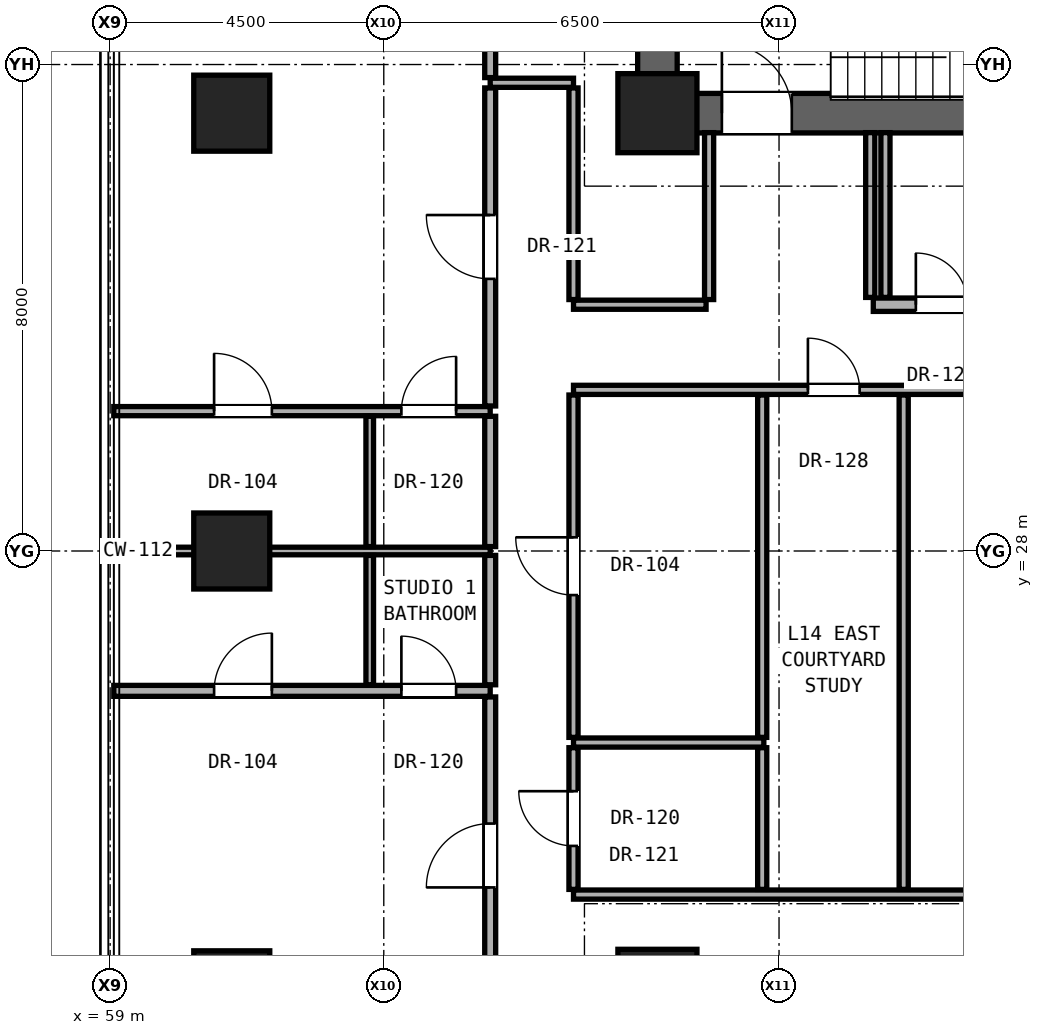
"""IFC4 building model, lengths in metres.
Left out: names, types, materials, properties, quantities, classifications, styles, units other than length and angle.
Written with IfcOpenShell. Run it as: python <this file> out.ifc"""

import sys

from ifc_helpers import new_model, si_unit, direction, frame, frame_2d, origin, origin_2d, place, context, subcontext, project, spatial, rectangle, hollow_rectangle, extrude, element, fill, save


model = new_model("IFC4")
c1 = context("Model", 3, precision=1e-05, world=origin(), true_north=direction((0.0, 1.0)))
c2 = subcontext(c1, "Body", "Model", "MODEL_VIEW")
j1 = project(units=[si_unit("LENGTHUNIT", "METRE"), si_unit("PLANEANGLEUNIT", "RADIAN")], contexts=[c1])
p1 = place(None, origin())
s1 = spatial("IfcSite", under=j1, at=p1, CompositionType="ELEMENT")
p2 = place(p1, origin())
s2 = spatial("IfcBuilding", under=s1, at=p2, CompositionType="ELEMENT")
p3 = place(p2, frame((0.0, 0.0, 52.1)))
s3 = spatial("IfcBuildingStorey", under=s2, at=p3, CompositionType="ELEMENT", Elevation=52.1)
for number, where, z_axis, x_axis in (
    (1, (68.0, 20.8, 0.0), (0.0, 0.0, 1.0), (1.0, 0.0, 0.0)),
    (2, (68.0, 35.2, 0.0), (0.0, 0.0, 1.0), (1.0, 0.0, 0.0)),
):
    element("IfcColumn", number, at=place(p3, frame(where, z_axis=z_axis, x_axis=x_axis)), inside=s3, PredefinedType="COLUMN", context=c2, shape_type="SweptSolid", body=[
        extrude(rectangle(XDim=1.3, YDim=1.3, at=origin_2d()), origin(), (0.0, 0.0, 1.0), 3.3),
    ])
for number, where, z_axis, x_axis in (
    (3, (61.0, 20.8, 0.0), (0.0, 0.0, 1.0), (1.0, 0.0, 0.0)),
    (4, (61.0, 28.0, 0.0), (0.0, 0.0, 1.0), (1.0, 0.0, 0.0)),
    (5, (61.0, 35.2, 0.0), (0.0, 0.0, 1.0), (1.0, 0.0, 0.0)),
):
    element("IfcColumn", number, at=place(p3, frame(where, z_axis=z_axis, x_axis=x_axis)), inside=s3, PredefinedType="COLUMN", context=c2, shape_type="SweptSolid", body=[
        extrude(hollow_rectangle(XDim=1.25, YDim=1.25, WallThickness=0.07, at=origin_2d()), origin(), (0.0, 0.0, 1.0), 3.3),
    ])
p4 = place(p3, frame((68.0, 35.2, 0.0), z_axis=(0.0, 0.0, 1.0), x_axis=(0.0, 1.0, 0.0)))
e6 = element("IfcWall", 6, at=p4, inside=s3, PredefinedType="SHEAR", context=c2, shape_type="SweptSolid", body=[
    extrude(rectangle(XDim=5.6, YDim=0.65, at=frame_2d((2.8, 0.0))), origin(), (0.0, 0.0, 1.0), 3.06),
])
p5 = place(p3, frame((68.0, 35.2, 0.0), z_axis=(0.0, 0.0, 1.0), x_axis=(1.0, 0.0, 0.0)))
e7 = element("IfcWall", 7, at=p5, inside=s3, PredefinedType="SHEAR", context=c2, shape_type="SweptSolid", body=[
    extrude(rectangle(XDim=17.0, YDim=0.65, at=frame_2d((8.5, 0.0))), origin(), (0.0, 0.0, 1.0), 3.06),
])
p6 = place(p5, frame((1.06, 0.0, 0.0)))
e8 = element("IfcOpeningElement", 8, at=p6, cuts=e7, PredefinedType="OPENING", context=c2, shape_type="SweptSolid", body=[
    extrude(rectangle(XDim=1.15, YDim=2.2, at=frame_2d((0.575, 1.1))), frame((0.0, 0.335, 0.0), z_axis=(0.0, -1.0, 0.0), x_axis=(1.0, 0.0, 0.0)), (0.0, 0.0, 1.0), 0.67),
])
p7 = place(p5, frame((8.75, 0.0, 0.0)))
e9 = element("IfcOpeningElement", 9, at=p7, cuts=e7, PredefinedType="OPENING", context=c2, shape_type="SweptSolid", body=[
    extrude(rectangle(XDim=1.4, YDim=2.35, at=frame_2d((0.7, 1.175))), frame((0.0, 0.335, 0.0), z_axis=(0.0, -1.0, 0.0), x_axis=(1.0, 0.0, 0.0)), (0.0, 0.0, 1.0), 0.67),
])
p8 = place(p5, frame((10.77, 0.0, 0.0)))
e10 = element("IfcOpeningElement", 10, at=p8, cuts=e7, PredefinedType="OPENING", context=c2, shape_type="SweptSolid", body=[
    extrude(rectangle(XDim=1.3, YDim=2.3, at=frame_2d((0.65, 1.15))), frame((0.0, 0.335, 0.0), z_axis=(0.0, -1.0, 0.0), x_axis=(1.0, 0.0, 0.0)), (0.0, 0.0, 1.0), 0.67),
])
p9 = place(p5, frame((12.69, 0.0, 0.0)))
e11 = element("IfcOpeningElement", 11, at=p9, cuts=e7, PredefinedType="OPENING", context=c2, shape_type="SweptSolid", body=[
    extrude(rectangle(XDim=1.3, YDim=2.3, at=frame_2d((0.65, 1.15))), frame((0.0, 0.335, 0.0), z_axis=(0.0, -1.0, 0.0), x_axis=(1.0, 0.0, 0.0)), (0.0, 0.0, 1.0), 0.67),
])
p10 = place(p5, frame((14.57, 0.0, 0.0)))
e12 = element("IfcOpeningElement", 12, at=p10, cuts=e7, PredefinedType="OPENING", context=c2, shape_type="SweptSolid", body=[
    extrude(rectangle(XDim=1.3, YDim=2.3, at=frame_2d((0.65, 1.15))), frame((0.0, 0.335, 0.0), z_axis=(0.0, -1.0, 0.0), x_axis=(1.0, 0.0, 0.0)), (0.0, 0.0, 1.0), 0.67),
])
p11 = place(p3, frame((66.62, 22.35, 0.0), z_axis=(0.0, 0.0, 1.0), x_axis=(1.0, 0.0, 0.0)))
e13 = element("IfcWall", 13, at=p11, inside=s3, PredefinedType="PARTITIONING", context=c2, shape_type="SweptSolid", body=[
    extrude(rectangle(XDim=19.63, YDim=0.15, at=frame_2d((9.815, 0.0))), origin(), (0.0, 0.0, 1.0), 2.125),
])
p12 = place(p11, frame((8.129, 0.0, 0.0)))
e14 = element("IfcOpeningElement", 14, at=p12, cuts=e13, PredefinedType="OPENING", context=c2, shape_type="SweptSolid", body=[
    extrude(rectangle(XDim=0.85, YDim=2.01, at=frame_2d((0.425, 1.005))), frame((0.0, 0.085, 0.0), z_axis=(0.0, -1.0, 0.0), x_axis=(1.0, 0.0, 0.0)), (0.0, 0.0, 1.0), 0.17),
])
p13 = place(p3, frame((66.62, 24.85, 0.0), z_axis=(0.0, 0.0, 1.0), x_axis=(1.0, 0.0, 0.0)))
e15 = element("IfcWall", 15, at=p13, inside=s3, PredefinedType="PARTITIONING", context=c2, shape_type="SweptSolid", body=[
    extrude(rectangle(XDim=3.13, YDim=0.15, at=frame_2d((1.565, 0.0))), origin(), (0.0, 0.0, 1.0), 2.125),
])
p14 = place(p3, frame((59.06, 25.7, 0.0), z_axis=(0.0, 0.0, 1.0), x_axis=(1.0, 0.0, 0.0)))
e16 = element("IfcWall", 16, at=p14, inside=s3, PredefinedType="PARTITIONING", context=c2, shape_type="SweptSolid", body=[
    extrude(rectangle(XDim=6.19, YDim=0.18, at=frame_2d((3.095, 0.0))), origin(), (0.0, 0.0, 1.0), 2.196),
])
p15 = place(p14, frame((1.649, 0.0, 0.0)))
e17 = element("IfcOpeningElement", 17, at=p15, cuts=e16, PredefinedType="OPENING", context=c2, shape_type="SweptSolid", body=[
    extrude(rectangle(XDim=0.95, YDim=2.15, at=frame_2d((0.475, 1.075))), frame((0.0, 0.1, 0.0), z_axis=(0.0, -1.0, 0.0), x_axis=(1.0, 0.0, 0.0)), (0.0, 0.0, 1.0), 0.2),
])
p16 = place(p14, frame((4.729, 0.0, 0.0)))
e18 = element("IfcOpeningElement", 18, at=p16, cuts=e16, PredefinedType="OPENING", context=c2, shape_type="SweptSolid", body=[
    extrude(rectangle(XDim=0.9, YDim=2.1, at=frame_2d((0.45, 1.05))), frame((0.0, 0.1, 0.0), z_axis=(0.0, -1.0, 0.0), x_axis=(1.0, 0.0, 0.0)), (0.0, 0.0, 1.0), 0.2),
])
p17 = place(p3, frame((59.06, 28.0, 0.0), z_axis=(0.0, 0.0, 1.0), x_axis=(1.0, 0.0, 0.0)))
e19 = element("IfcWall", 19, at=p17, inside=s3, PredefinedType="PARTITIONING", context=c2, shape_type="SweptSolid", body=[
    extrude(rectangle(XDim=6.19, YDim=0.125, at=frame_2d((3.095, 0.0))), origin(), (0.0, 0.0, 1.0), 2.196),
])
p18 = place(p3, frame((59.06, 30.3, 0.0), z_axis=(0.0, 0.0, 1.0), x_axis=(1.0, 0.0, 0.0)))
e20 = element("IfcWall", 20, at=p18, inside=s3, PredefinedType="PARTITIONING", context=c2, shape_type="SweptSolid", body=[
    extrude(rectangle(XDim=6.19, YDim=0.15, at=frame_2d((3.095, 0.0))), origin(), (0.0, 0.0, 1.0), 2.196),
])
p19 = place(p18, frame((1.649, 0.0, 0.0)))
e21 = element("IfcOpeningElement", 21, at=p19, cuts=e20, PredefinedType="OPENING", context=c2, shape_type="SweptSolid", body=[
    extrude(rectangle(XDim=0.95, YDim=2.15, at=frame_2d((0.475, 1.075))), frame((0.0, 0.085, 0.0), z_axis=(0.0, -1.0, 0.0), x_axis=(1.0, 0.0, 0.0)), (0.0, 0.0, 1.0), 0.17),
])
p20 = place(p18, frame((4.729, 0.0, 0.0)))
e22 = element("IfcOpeningElement", 22, at=p20, cuts=e20, PredefinedType="OPENING", context=c2, shape_type="SweptSolid", body=[
    extrude(rectangle(XDim=0.9, YDim=2.1, at=frame_2d((0.45, 1.05))), frame((0.0, 0.085, 0.0), z_axis=(0.0, -1.0, 0.0), x_axis=(1.0, 0.0, 0.0)), (0.0, 0.0, 1.0), 0.17),
])
p21 = place(p3, frame((66.62, 30.65, 0.0), z_axis=(0.0, 0.0, 1.0), x_axis=(1.0, 0.0, 0.0)))
e23 = element("IfcWall", 23, at=p21, inside=s3, PredefinedType="PARTITIONING", context=c2, shape_type="SweptSolid", body=[
    extrude(rectangle(XDim=19.63, YDim=0.15, at=frame_2d((9.815, 0.0))), origin(), (0.0, 0.0, 1.0), 2.125),
])
p22 = place(p21, frame((3.855, 0.0, 0.0)))
e24 = element("IfcOpeningElement", 24, at=p22, cuts=e23, PredefinedType="OPENING", context=c2, shape_type="SweptSolid", body=[
    extrude(rectangle(XDim=0.85, YDim=2.01, at=frame_2d((0.425, 1.005))), frame((0.0, 0.085, 0.0), z_axis=(0.0, -1.0, 0.0), x_axis=(1.0, 0.0, 0.0)), (0.0, 0.0, 1.0), 0.17),
])
p23 = place(p21, frame((15.209, 0.0, 0.0)))
e25 = element("IfcOpeningElement", 25, at=p23, cuts=e23, PredefinedType="OPENING", context=c2, shape_type="SweptSolid", body=[
    extrude(rectangle(XDim=0.85, YDim=2.01, at=frame_2d((0.425, 1.005))), frame((0.0, 0.085, 0.0), z_axis=(0.0, -1.0, 0.0), x_axis=(1.0, 0.0, 0.0)), (0.0, 0.0, 1.0), 0.17),
])
p24 = place(p3, frame((66.62, 32.05, 0.0), z_axis=(0.0, 0.0, 1.0), x_axis=(1.0, 0.0, 0.0)))
e26 = element("IfcWall", 26, at=p24, inside=s3, PredefinedType="PARTITIONING", context=c2, shape_type="SweptSolid", body=[
    extrude(rectangle(XDim=2.18, YDim=0.15, at=frame_2d((1.09, 0.0))), origin(), (0.0, 0.0, 1.0), 2.125),
])
p25 = place(p3, frame((71.55, 32.05, 0.0), z_axis=(0.0, 0.0, 1.0), x_axis=(1.0, 0.0, 0.0)))
e27 = element("IfcWall", 27, at=p25, inside=s3, PredefinedType="SOLIDWALL", context=c2, shape_type="SweptSolid", body=[
    extrude(rectangle(XDim=14.7, YDim=0.22, at=frame_2d((7.35, 0.0))), origin(), (0.0, 0.0, 1.0), 2.125),
])
p26 = place(p25, frame((11.39, 0.0, 0.0)))
e28 = element("IfcOpeningElement", 28, at=p26, cuts=e27, PredefinedType="OPENING", context=c2, shape_type="SweptSolid", body=[
    extrude(rectangle(XDim=0.85, YDim=2.01, at=frame_2d((0.425, 1.005))), frame((0.0, 0.12, 0.0), z_axis=(0.0, -1.0, 0.0), x_axis=(1.0, 0.0, 0.0)), (0.0, 0.0, 1.0), 0.24),
])
p27 = place(p25, frame((6.065, 0.0, 0.0)))
e29 = element("IfcOpeningElement", 29, at=p27, cuts=e27, PredefinedType="OPENING", context=c2, shape_type="SweptSolid", body=[
    extrude(rectangle(XDim=0.85, YDim=2.01, at=frame_2d((0.425, 1.005))), frame((0.0, 0.12, 0.0), z_axis=(0.0, -1.0, 0.0), x_axis=(1.0, 0.0, 0.0)), (0.0, 0.0, 1.0), 0.24),
])
p28 = place(p25, frame((0.7, 0.0, 0.0)))
e30 = element("IfcOpeningElement", 30, at=p28, cuts=e27, PredefinedType="OPENING", context=c2, shape_type="SweptSolid", body=[
    extrude(rectangle(XDim=0.85, YDim=2.01, at=frame_2d((0.425, 1.005))), frame((0.0, 0.12, 0.0), z_axis=(0.0, -1.0, 0.0), x_axis=(1.0, 0.0, 0.0)), (0.0, 0.0, 1.0), 0.24),
])
p29 = place(p25, frame((2.55, 0.0, 0.0)))
e31 = element("IfcOpeningElement", 31, at=p29, cuts=e27, PredefinedType="OPENING", context=c2, shape_type="SweptSolid", body=[
    extrude(rectangle(XDim=0.85, YDim=2.01, at=frame_2d((0.425, 1.005))), frame((0.0, 0.12, 0.0), z_axis=(0.0, -1.0, 0.0), x_axis=(1.0, 0.0, 0.0)), (0.0, 0.0, 1.0), 0.24),
])
p30 = place(p3, frame((65.25, 35.7, 0.0), z_axis=(0.0, 0.0, 1.0), x_axis=(1.0, 0.0, 0.0)))
e32 = element("IfcWall", 32, at=p30, inside=s3, PredefinedType="PARTITIONING", context=c2, shape_type="SweptSolid", body=[
    extrude(rectangle(XDim=1.37, YDim=0.15, at=frame_2d((0.685, 0.0))), origin(), (0.0, 0.0, 1.0), 3.06),
])
p31 = place(p3, frame((63.269, 25.8, 0.0), z_axis=(0.0, 0.0, 1.0), x_axis=(0.0, 1.0, 0.0)))
e33 = element("IfcWall", 33, at=p31, inside=s3, PredefinedType="PARTITIONING", context=c2, shape_type="SweptSolid", body=[
    extrude(rectangle(XDim=2.127, YDim=0.125, at=frame_2d((1.064, 0.0))), origin(), (0.0, 0.0, 1.0), 2.279),
])
p32 = place(p3, frame((63.269, 28.073, 0.0), z_axis=(0.0, 0.0, 1.0), x_axis=(0.0, 1.0, 0.0)))
e34 = element("IfcWall", 34, at=p32, inside=s3, PredefinedType="PARTITIONING", context=c2, shape_type="SweptSolid", body=[
    extrude(rectangle(XDim=2.143, YDim=0.125, at=frame_2d((1.071, 0.0))), origin(), (0.0, 0.0, 1.0), 2.279),
])
p33 = place(p3, frame((65.25, 20.385, 0.0), z_axis=(0.0, 0.0, 1.0), x_axis=(0.0, 1.0, 0.0)))
e35 = element("IfcWall", 35, at=p33, inside=s3, PredefinedType="PARTITIONING", context=c2, shape_type="SweptSolid", body=[
    extrude(rectangle(XDim=5.215, YDim=0.18, at=frame_2d((2.607, 0.0))), origin(), (0.0, 0.0, 1.0), 2.452),
])
p34 = place(p33, frame((2.083, 0.0, 0.0)))
e36 = element("IfcOpeningElement", 36, at=p34, cuts=e35, PredefinedType="OPENING", context=c2, shape_type="SweptSolid", body=[
    extrude(rectangle(XDim=1.05, YDim=2.2, at=frame_2d((0.525, 1.1))), frame((0.0, 0.1, 0.0), z_axis=(0.0, -1.0, 0.0), x_axis=(1.0, 0.0, 0.0)), (0.0, 0.0, 1.0), 0.2),
])
p35 = place(p3, frame((65.25, 25.8, 0.0), z_axis=(0.0, 0.0, 1.0), x_axis=(0.0, 1.0, 0.0)))
e37 = element("IfcWall", 37, at=p35, inside=s3, PredefinedType="PARTITIONING", context=c2, shape_type="SweptSolid", body=[
    extrude(rectangle(XDim=2.127, YDim=0.18, at=frame_2d((1.064, 0.0))), origin(), (0.0, 0.0, 1.0), 2.279),
])
p36 = place(p3, frame((65.25, 28.073, 0.0), z_axis=(0.0, 0.0, 1.0), x_axis=(0.0, 1.0, 0.0)))
e38 = element("IfcWall", 38, at=p36, inside=s3, PredefinedType="PARTITIONING", context=c2, shape_type="SweptSolid", body=[
    extrude(rectangle(XDim=2.143, YDim=0.18, at=frame_2d((1.071, 0.0))), origin(), (0.0, 0.0, 1.0), 2.279),
])
p37 = place(p3, frame((65.25, 30.385, 0.0), z_axis=(0.0, 0.0, 1.0), x_axis=(0.0, 1.0, 0.0)))
e39 = element("IfcWall", 39, at=p37, inside=s3, PredefinedType="PARTITIONING", context=c2, shape_type="SweptSolid", body=[
    extrude(rectangle(XDim=5.23, YDim=0.18, at=frame_2d((2.615, 0.0))), origin(), (0.0, 0.0, 1.0), 2.452),
])
p38 = place(p37, frame((2.09, 0.0, 0.0)))
e40 = element("IfcOpeningElement", 40, at=p38, cuts=e39, PredefinedType="OPENING", context=c2, shape_type="SweptSolid", body=[
    extrude(rectangle(XDim=1.05, YDim=2.2, at=frame_2d((0.525, 1.1))), frame((0.0, 0.1, 0.0), z_axis=(0.0, -1.0, 0.0), x_axis=(1.0, 0.0, 0.0)), (0.0, 0.0, 1.0), 0.2),
])
p39 = place(p3, frame((65.25, 35.785, 0.0), z_axis=(0.0, 0.0, 1.0), x_axis=(0.0, 1.0, 0.0)))
e41 = element("IfcWall", 41, at=p39, inside=s3, PredefinedType="PARTITIONING", context=c2, shape_type="SweptSolid", body=[
    extrude(rectangle(XDim=3.36, YDim=0.18, at=frame_2d((1.68, 0.0))), origin(), (0.0, 0.0, 1.0), 2.436),
])
p40 = place(p3, frame((66.62, 22.435, 0.0), z_axis=(0.0, 0.0, 1.0), x_axis=(0.0, 1.0, 0.0)))
e42 = element("IfcWall", 42, at=p40, inside=s3, PredefinedType="PARTITIONING", context=c2, shape_type="SweptSolid", body=[
    extrude(rectangle(XDim=2.33, YDim=0.15, at=frame_2d((1.165, 0.0))), origin(), (0.0, 0.0, 1.0), 3.06),
])
p41 = place(p40, frame((0.715, 0.0, 0.0)))
e43 = element("IfcOpeningElement", 43, at=p41, cuts=e42, PredefinedType="OPENING", context=c2, shape_type="SweptSolid", body=[
    extrude(rectangle(XDim=0.9, YDim=2.1, at=frame_2d((0.45, 1.05))), frame((0.0, 0.085, 0.0), z_axis=(0.0, -1.0, 0.0), x_axis=(1.0, 0.0, 0.0)), (0.0, 0.0, 1.0), 0.17),
])
p42 = place(p3, frame((66.62, 24.935, 0.0), z_axis=(0.0, 0.0, 1.0), x_axis=(0.0, 1.0, 0.0)))
e44 = element("IfcWall", 44, at=p42, inside=s3, PredefinedType="PARTITIONING", context=c2, shape_type="SweptSolid", body=[
    extrude(rectangle(XDim=5.63, YDim=0.15, at=frame_2d((2.815, 0.0))), origin(), (0.0, 0.0, 1.0), 2.279),
])
p43 = place(p42, frame((2.34, 0.0, 0.0)))
e45 = element("IfcOpeningElement", 45, at=p43, cuts=e44, PredefinedType="OPENING", context=c2, shape_type="SweptSolid", body=[
    extrude(rectangle(XDim=0.95, YDim=2.15, at=frame_2d((0.475, 1.075))), frame((0.0, 0.085, 0.0), z_axis=(0.0, -1.0, 0.0), x_axis=(1.0, 0.0, 0.0)), (0.0, 0.0, 1.0), 0.17),
])
p44 = place(p3, frame((66.62, 32.135, 0.0), z_axis=(0.0, 0.0, 1.0), x_axis=(0.0, 1.0, 0.0)))
e46 = element("IfcWall", 46, at=p44, inside=s3, PredefinedType="PARTITIONING", context=c2, shape_type="SweptSolid", body=[
    extrude(rectangle(XDim=3.48, YDim=0.15, at=frame_2d((1.74, 0.0))), origin(), (0.0, 0.0, 1.0), 2.452),
])
p45 = place(p3, frame((68.85, 32.135, 0.0), z_axis=(0.0, 0.0, 1.0), x_axis=(0.0, 1.0, 0.0)))
e47 = element("IfcWall", 47, at=p45, inside=s3, PredefinedType="PARTITIONING", context=c2, shape_type="SweptSolid", body=[
    extrude(rectangle(XDim=2.745, YDim=0.15, at=frame_2d((1.373, 0.0))), origin(), (0.0, 0.0, 1.0), 3.06),
])
p46 = place(p3, frame((69.723, 22.435, 0.0), z_axis=(0.0, 0.0, 1.0), x_axis=(0.0, 1.0, 0.0)))
e48 = element("IfcWall", 48, at=p46, inside=s3, PredefinedType="PARTITIONING", context=c2, shape_type="SweptSolid", body=[
    extrude(rectangle(XDim=2.33, YDim=0.15, at=frame_2d((1.165, 0.0))), origin(), (0.0, 0.0, 1.0), 3.06),
])
p47 = place(p3, frame((69.723, 24.935, 0.0), z_axis=(0.0, 0.0, 1.0), x_axis=(0.0, 1.0, 0.0)))
e49 = element("IfcWall", 49, at=p47, inside=s3, PredefinedType="PARTITIONING", context=c2, shape_type="SweptSolid", body=[
    extrude(rectangle(XDim=5.63, YDim=0.15, at=frame_2d((2.815, 0.0))), origin(), (0.0, 0.0, 1.0), 2.125),
])
for number, where, z_axis, x_axis in (
    (50, (71.5, 32.17, 0.0), (0.0, 0.0, 1.0), (0.0, 1.0, 0.0)),
    (51, (71.75, 32.17, 0.0), (0.0, 0.0, 1.0), (0.0, 1.0, 0.0)),
):
    element("IfcWall", number, at=place(p3, frame(where, z_axis=z_axis, x_axis=x_axis)), inside=s3, PredefinedType="PARTITIONING", context=c2, shape_type="SweptSolid", body=[
        extrude(rectangle(XDim=2.71, YDim=0.15, at=frame_2d((1.355, 0.0))), origin(), (0.0, 0.0, 1.0), 3.06),
    ])
p48 = place(p3, frame((72.05, 22.435, 0.0), z_axis=(0.0, 0.0, 1.0), x_axis=(0.0, 1.0, 0.0)))
e52 = element("IfcWall", 52, at=p48, inside=s3, PredefinedType="PARTITIONING", context=c2, shape_type="SweptSolid", body=[
    extrude(rectangle(XDim=8.13, YDim=0.15, at=frame_2d((4.065, 0.0))), origin(), (0.0, 0.0, 1.0), 2.125),
])
p49 = place(p6, origin())
e53 = element("IfcDoor", 53, at=p49, inside=s3, OperationType="SINGLE_SWING_LEFT", PredefinedType="DOOR", context=c2, shape_type="SweptSolid", body=[
    extrude(rectangle(XDim=1.15, YDim=2.2, at=frame_2d((0.575, 1.1))), frame((0.0, 0.025, 0.0), z_axis=(0.0, -1.0, 0.0), x_axis=(1.0, 0.0, 0.0)), (0.0, 0.0, 1.0), 0.05),
])
fill(e8, e53)
p50 = place(p28, origin())
e54 = element("IfcDoor", 54, at=p50, inside=s3, OperationType="SINGLE_SWING_LEFT", PredefinedType="DOOR", context=c2, shape_type="SweptSolid", body=[
    extrude(rectangle(XDim=0.85, YDim=2.01, at=frame_2d((0.425, 1.005))), frame((0.0, 0.025, 0.0), z_axis=(0.0, -1.0, 0.0), x_axis=(1.0, 0.0, 0.0)), (0.0, 0.0, 1.0), 0.05),
])
fill(e30, e54)
p51 = place(p41, origin())
e55 = element("IfcDoor", 55, at=p51, inside=s3, OperationType="SINGLE_SWING_RIGHT", PredefinedType="DOOR", context=c2, shape_type="SweptSolid", body=[
    extrude(rectangle(XDim=0.9, YDim=2.1, at=frame_2d((0.45, 1.05))), frame((0.0, 0.025, 0.0), z_axis=(0.0, -1.0, 0.0), x_axis=(1.0, 0.0, 0.0)), (0.0, 0.0, 1.0), 0.05),
])
fill(e43, e55)
p52 = place(p34, origin())
e56 = element("IfcDoor", 56, at=p52, inside=s3, OperationType="SINGLE_SWING_LEFT", PredefinedType="DOOR", context=c2, shape_type="SweptSolid", body=[
    extrude(rectangle(XDim=1.05, YDim=2.2, at=frame_2d((0.525, 1.1))), frame((0.0, 0.025, 0.0), z_axis=(0.0, -1.0, 0.0), x_axis=(1.0, 0.0, 0.0)), (0.0, 0.0, 1.0), 0.05),
])
fill(e36, e56)
p53 = place(p15, origin())
e57 = element("IfcDoor", 57, at=p53, inside=s3, OperationType="SINGLE_SWING_RIGHT", PredefinedType="DOOR", context=c2, shape_type="SweptSolid", body=[
    extrude(rectangle(XDim=0.95, YDim=2.15, at=frame_2d((0.475, 1.075))), frame((0.0, 0.025, 0.0), z_axis=(0.0, -1.0, 0.0), x_axis=(1.0, 0.0, 0.0)), (0.0, 0.0, 1.0), 0.05),
])
fill(e17, e57)
p54 = place(p16, origin())
e58 = element("IfcDoor", 58, at=p54, inside=s3, OperationType="SINGLE_SWING_LEFT", PredefinedType="DOOR", context=c2, shape_type="SweptSolid", body=[
    extrude(rectangle(XDim=0.9, YDim=2.1, at=frame_2d((0.45, 1.05))), frame((0.0, 0.025, 0.0), z_axis=(0.0, -1.0, 0.0), x_axis=(1.0, 0.0, 0.0)), (0.0, 0.0, 1.0), 0.05),
])
fill(e18, e58)
p55 = place(p38, origin())
e59 = element("IfcDoor", 59, at=p55, inside=s3, OperationType="SINGLE_SWING_RIGHT", PredefinedType="DOOR", context=c2, shape_type="SweptSolid", body=[
    extrude(rectangle(XDim=1.05, YDim=2.2, at=frame_2d((0.525, 1.1))), frame((0.0, 0.025, 0.0), z_axis=(0.0, -1.0, 0.0), x_axis=(1.0, 0.0, 0.0)), (0.0, 0.0, 1.0), 0.05),
])
fill(e40, e59)
p56 = place(p19, origin())
e60 = element("IfcDoor", 60, at=p56, inside=s3, OperationType="SINGLE_SWING_LEFT", PredefinedType="DOOR", context=c2, shape_type="SweptSolid", body=[
    extrude(rectangle(XDim=0.95, YDim=2.15, at=frame_2d((0.475, 1.075))), frame((0.0, 0.025, 0.0), z_axis=(0.0, -1.0, 0.0), x_axis=(1.0, 0.0, 0.0)), (0.0, 0.0, 1.0), 0.05),
])
fill(e21, e60)
p57 = place(p20, origin())
e61 = element("IfcDoor", 61, at=p57, inside=s3, OperationType="SINGLE_SWING_RIGHT", PredefinedType="DOOR", context=c2, shape_type="SweptSolid", body=[
    extrude(rectangle(XDim=0.9, YDim=2.1, at=frame_2d((0.45, 1.05))), frame((0.0, 0.025, 0.0), z_axis=(0.0, -1.0, 0.0), x_axis=(1.0, 0.0, 0.0)), (0.0, 0.0, 1.0), 0.05),
])
fill(e22, e61)
p58 = place(p43, origin())
e62 = element("IfcDoor", 62, at=p58, inside=s3, OperationType="SINGLE_SWING_RIGHT", PredefinedType="DOOR", context=c2, shape_type="SweptSolid", body=[
    extrude(rectangle(XDim=0.95, YDim=2.15, at=frame_2d((0.475, 1.075))), frame((0.0, 0.025, 0.0), z_axis=(0.0, -1.0, 0.0), x_axis=(1.0, 0.0, 0.0)), (0.0, 0.0, 1.0), 0.05),
])
fill(e45, e62)
p59 = place(p22, origin())
e63 = element("IfcDoor", 63, at=p59, inside=s3, OperationType="SINGLE_SWING_LEFT", PredefinedType="DOOR", context=c2, shape_type="SweptSolid", body=[
    extrude(rectangle(XDim=0.85, YDim=2.01, at=frame_2d((0.425, 1.005))), frame((0.0, 0.025, 0.0), z_axis=(0.0, -1.0, 0.0), x_axis=(1.0, 0.0, 0.0)), (0.0, 0.0, 1.0), 0.05),
])
fill(e24, e63)
save(model, sys.argv[1])
